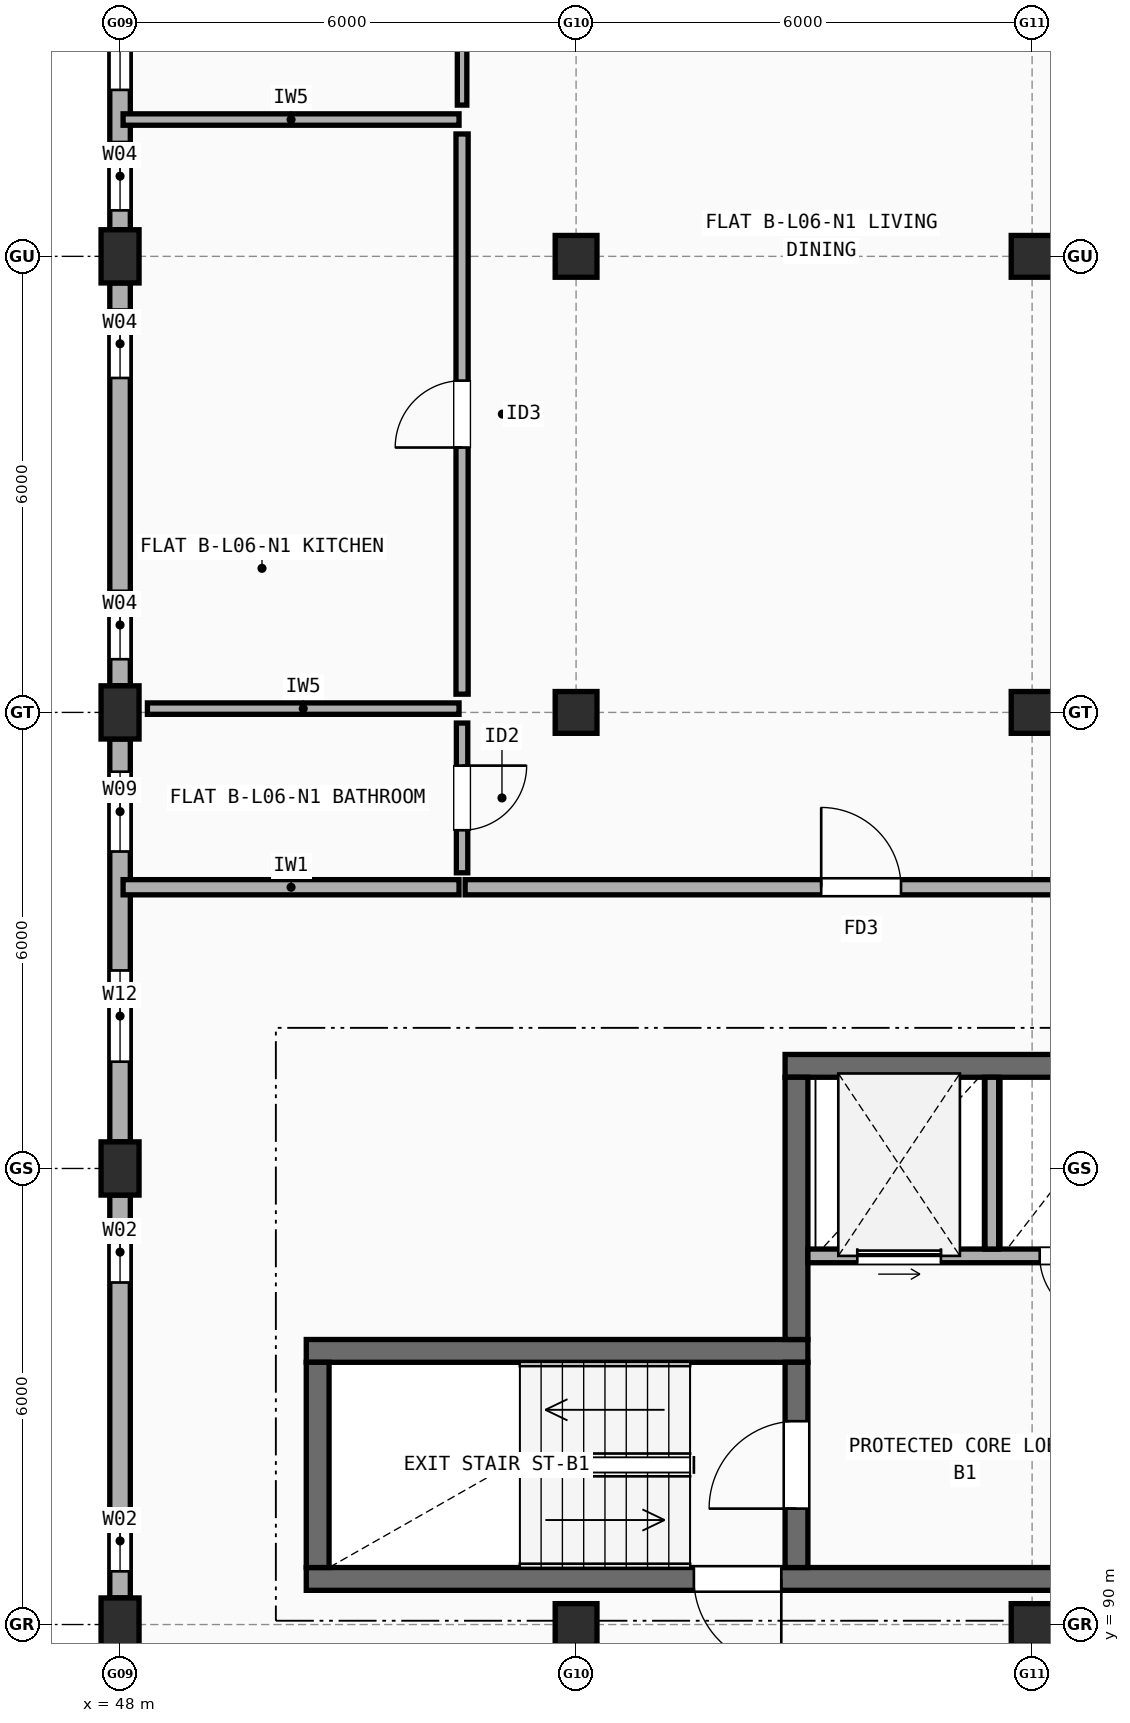
"""IFC4 building model, lengths in metres.
Left out: names, types, materials, properties, quantities, classifications, styles, units other than length and angle.
Written with IfcOpenShell. Run it as: python <this file> out.ifc"""

import sys

from ifc_helpers import new_model, si_unit, direction, frame, frame_2d, origin, origin_2d, place, context, subcontext, project, spatial, rectangle, extrude, element, fill, save


model = new_model("IFC4")
c1 = context("Model", 3, precision=1e-05, world=origin(), true_north=direction((0.0, 1.0)))
c2 = subcontext(c1, "Body", "Model", "MODEL_VIEW")
j1 = project(units=[si_unit("LENGTHUNIT", "METRE"), si_unit("PLANEANGLEUNIT", "RADIAN")], contexts=[c1])
p1 = place(None, origin())
s1 = spatial("IfcSite", under=j1, at=p1, CompositionType="ELEMENT")
p2 = place(p1, origin())
s2 = spatial("IfcBuilding", under=s1, at=p2, CompositionType="ELEMENT")
p3 = place(p2, frame((0.0, 0.0, 20.5)))
s3 = spatial("IfcBuildingStorey", under=s2, at=p3, CompositionType="ELEMENT", Elevation=20.5)
for number, where, z_axis, x_axis in (
    (1, (48.0, 90.0, 0.0), (0.0, 0.0, 1.0), (1.0, 0.0, 0.0)),
    (2, (48.0, 96.0, 0.0), (0.0, 0.0, 1.0), (1.0, 0.0, 0.0)),
    (3, (48.0, 102.0, 0.0), (0.0, 0.0, 1.0), (1.0, 0.0, 0.0)),
    (4, (48.0, 108.0, 0.0), (0.0, 0.0, 1.0), (1.0, 0.0, 0.0)),
):
    element("IfcColumn", number, at=place(p3, frame(where, z_axis=z_axis, x_axis=x_axis)), inside=s3, PredefinedType="COLUMN", context=c2, shape_type="SweptSolid", body=[
        extrude(rectangle(XDim=0.5, YDim=0.7, at=origin_2d()), origin(), (0.0, 0.0, 1.0), 2.97),
    ])
for number, where, z_axis, x_axis in (
    (5, (54.0, 90.0, 0.0), (0.0, 0.0, 1.0), (1.0, 0.0, 0.0)),
    (6, (54.0, 102.0, 0.0), (0.0, 0.0, 1.0), (1.0, 0.0, 0.0)),
    (7, (54.0, 108.0, 0.0), (0.0, 0.0, 1.0), (1.0, 0.0, 0.0)),
    (8, (60.0, 90.0, 0.0), (0.0, 0.0, 1.0), (1.0, 0.0, 0.0)),
    (9, (60.0, 102.0, 0.0), (0.0, 0.0, 1.0), (1.0, 0.0, 0.0)),
    (10, (60.0, 108.0, 0.0), (0.0, 0.0, 1.0), (1.0, 0.0, 0.0)),
):
    element("IfcColumn", number, at=place(p3, frame(where, z_axis=z_axis, x_axis=x_axis)), inside=s3, PredefinedType="COLUMN", context=c2, shape_type="SweptSolid", body=[
        extrude(rectangle(XDim=0.55, YDim=0.55, at=origin_2d()), origin(), (0.0, 0.0, 1.0), 2.97),
    ])
p4 = place(p3, frame((48.0, 113.65, 0.0), z_axis=(0.0, 0.0, 1.0), x_axis=(0.0, -1.0, 0.0)))
e11 = element("IfcWall", 11, at=p4, inside=s3, PredefinedType="STANDARD", context=c2, shape_type="SweptSolid", body=[
    extrude(rectangle(XDim=5.3, YDim=0.27, at=frame_2d((2.65, 0.0))), origin(), (0.0, 0.0, 1.0), 2.452),
])
p5 = place(p4, frame((0.35, 0.0, 0.9)))
e12 = element("IfcOpeningElement", 12, at=p5, cuts=e11, PredefinedType="OPENING", context=c2, shape_type="SweptSolid", body=[
    extrude(rectangle(XDim=1.2, YDim=1.35, at=frame_2d((0.6, 0.675))), frame((0.0, 0.145, 0.0), z_axis=(0.0, -1.0, 0.0), x_axis=(1.0, 0.0, 0.0)), (0.0, 0.0, 1.0), 0.29),
])
p6 = place(p4, frame((2.26, 0.0, 0.9)))
e13 = element("IfcOpeningElement", 13, at=p6, cuts=e11, PredefinedType="OPENING", context=c2, shape_type="SweptSolid", body=[
    extrude(rectangle(XDim=1.2, YDim=1.35, at=frame_2d((0.6, 0.675))), frame((0.0, 0.145, 0.0), z_axis=(0.0, -1.0, 0.0), x_axis=(1.0, 0.0, 0.0)), (0.0, 0.0, 1.0), 0.29),
])
p7 = place(p4, frame((4.145, 0.0, 0.9)))
e14 = element("IfcOpeningElement", 14, at=p7, cuts=e11, PredefinedType="OPENING", context=c2, shape_type="SweptSolid", body=[
    extrude(rectangle(XDim=0.9, YDim=1.3, at=frame_2d((0.45, 0.65))), frame((0.0, 0.145, 0.0), z_axis=(0.0, -1.0, 0.0), x_axis=(1.0, 0.0, 0.0)), (0.0, 0.0, 1.0), 0.29),
])
p8 = place(p3, frame((48.0, 107.65, 0.0), z_axis=(0.0, 0.0, 1.0), x_axis=(0.0, -1.0, 0.0)))
e15 = element("IfcWall", 15, at=p8, inside=s3, PredefinedType="STANDARD", context=c2, shape_type="SweptSolid", body=[
    extrude(rectangle(XDim=5.3, YDim=0.27, at=frame_2d((2.65, 0.0))), origin(), (0.0, 0.0, 1.0), 2.452),
])
p9 = place(p8, frame((0.35, 0.0, 0.9)))
e16 = element("IfcOpeningElement", 16, at=p9, cuts=e15, PredefinedType="OPENING", context=c2, shape_type="SweptSolid", body=[
    extrude(rectangle(XDim=0.9, YDim=1.3, at=frame_2d((0.45, 0.65))), frame((0.0, 0.145, 0.0), z_axis=(0.0, -1.0, 0.0), x_axis=(1.0, 0.0, 0.0)), (0.0, 0.0, 1.0), 0.29),
])
p10 = place(p8, frame((4.05, 0.0, 0.9)))
e17 = element("IfcOpeningElement", 17, at=p10, cuts=e15, PredefinedType="OPENING", context=c2, shape_type="SweptSolid", body=[
    extrude(rectangle(XDim=0.9, YDim=1.3, at=frame_2d((0.45, 0.65))), frame((0.0, 0.145, 0.0), z_axis=(0.0, -1.0, 0.0), x_axis=(1.0, 0.0, 0.0)), (0.0, 0.0, 1.0), 0.29),
])
p11 = place(p3, frame((48.0, 101.65, 0.0), z_axis=(0.0, 0.0, 1.0), x_axis=(0.0, -1.0, 0.0)))
e18 = element("IfcWall", 18, at=p11, inside=s3, PredefinedType="STANDARD", context=c2, shape_type="SweptSolid", body=[
    extrude(rectangle(XDim=5.3, YDim=0.27, at=frame_2d((2.65, 0.0))), origin(), (0.0, 0.0, 1.0), 2.452),
])
p12 = place(p11, frame((0.43, 0.0, 0.9)))
e19 = element("IfcOpeningElement", 19, at=p12, cuts=e18, PredefinedType="OPENING", context=c2, shape_type="SweptSolid", body=[
    extrude(rectangle(XDim=1.05, YDim=1.35, at=frame_2d((0.525, 0.675))), frame((0.0, 0.145, 0.0), z_axis=(0.0, -1.0, 0.0), x_axis=(1.0, 0.0, 0.0)), (0.0, 0.0, 1.0), 0.29),
])
p13 = place(p11, frame((3.045, 0.0, 0.9)))
e20 = element("IfcOpeningElement", 20, at=p13, cuts=e18, PredefinedType="OPENING", context=c2, shape_type="SweptSolid", body=[
    extrude(rectangle(XDim=1.2, YDim=1.35, at=frame_2d((0.6, 0.675))), frame((0.0, 0.145, 0.0), z_axis=(0.0, -1.0, 0.0), x_axis=(1.0, 0.0, 0.0)), (0.0, 0.0, 1.0), 0.29),
])
p14 = place(p3, frame((48.0, 95.65, 0.0), z_axis=(0.0, 0.0, 1.0), x_axis=(0.0, -1.0, 0.0)))
e21 = element("IfcWall", 21, at=p14, inside=s3, PredefinedType="STANDARD", context=c2, shape_type="SweptSolid", body=[
    extrude(rectangle(XDim=5.3, YDim=0.27, at=frame_2d((2.65, 0.0))), origin(), (0.0, 0.0, 1.0), 2.452),
])
p15 = place(p14, frame((0.35, 0.0, 0.9)))
e22 = element("IfcOpeningElement", 22, at=p15, cuts=e21, PredefinedType="OPENING", context=c2, shape_type="SweptSolid", body=[
    extrude(rectangle(XDim=0.8, YDim=1.2, at=frame_2d((0.4, 0.6))), frame((0.0, 0.145, 0.0), z_axis=(0.0, -1.0, 0.0), x_axis=(1.0, 0.0, 0.0)), (0.0, 0.0, 1.0), 0.29),
])
p16 = place(p14, frame((4.15, 0.0, 0.9)))
e23 = element("IfcOpeningElement", 23, at=p16, cuts=e21, PredefinedType="OPENING", context=c2, shape_type="SweptSolid", body=[
    extrude(rectangle(XDim=0.8, YDim=1.2, at=frame_2d((0.4, 0.6))), frame((0.0, 0.145, 0.0), z_axis=(0.0, -1.0, 0.0), x_axis=(1.0, 0.0, 0.0)), (0.0, 0.0, 1.0), 0.29),
])
p17 = place(p3, frame((50.45, 90.6, 0.0), z_axis=(0.0, 0.0, 1.0), x_axis=(1.0, 0.0, 0.0)))
e24 = element("IfcWall", 24, at=p17, inside=s3, PredefinedType="SHEAR", context=c2, shape_type="SweptSolid", body=[
    extrude(rectangle(XDim=11.35, YDim=0.3, at=frame_2d((5.675, 0.0))), origin(), (0.0, 0.0, 1.0), 2.97),
])
p18 = place(p17, frame((5.1, 0.0, 0.0)))
e25 = element("IfcOpeningElement", 25, at=p18, cuts=e24, PredefinedType="OPENING", context=c2, shape_type="SweptSolid", body=[
    extrude(rectangle(XDim=1.15, YDim=2.15, at=frame_2d((0.575, 1.075))), frame((0.0, 0.16, 0.0), z_axis=(0.0, -1.0, 0.0), x_axis=(1.0, 0.0, 0.0)), (0.0, 0.0, 1.0), 0.32),
])
p19 = place(p3, frame((57.05, 93.6, 0.0), z_axis=(0.0, 0.0, 1.0), x_axis=(-1.0, 0.0, 0.0)))
e26 = element("IfcWall", 26, at=p19, inside=s3, PredefinedType="SHEAR", context=c2, shape_type="SweptSolid", body=[
    extrude(rectangle(XDim=6.6, YDim=0.3, at=frame_2d((3.3, 0.0))), origin(), (0.0, 0.0, 1.0), 2.97),
])
p20 = place(p3, frame((50.6, 93.45, 0.0), z_axis=(0.0, 0.0, 1.0), x_axis=(0.0, -1.0, 0.0)))
e27 = element("IfcWall", 27, at=p20, inside=s3, PredefinedType="SHEAR", context=c2, shape_type="SweptSolid", body=[
    extrude(rectangle(XDim=2.7, YDim=0.3, at=frame_2d((1.35, 0.0))), origin(), (0.0, 0.0, 1.0), 2.97),
])
p21 = place(p3, frame((56.9, 90.75, 0.0), z_axis=(0.0, 0.0, 1.0), x_axis=(0.0, 1.0, 0.0)))
e28 = element("IfcWall", 28, at=p21, inside=s3, PredefinedType="SHEAR", context=c2, shape_type="SweptSolid", body=[
    extrude(rectangle(XDim=2.7, YDim=0.3, at=frame_2d((1.35, 0.0))), origin(), (0.0, 0.0, 1.0), 2.97),
])
p22 = place(p21, frame((0.775, 0.0, 0.0)))
e29 = element("IfcOpeningElement", 29, at=p22, cuts=e28, PredefinedType="OPENING", context=c2, shape_type="SweptSolid", body=[
    extrude(rectangle(XDim=1.15, YDim=2.15, at=frame_2d((0.575, 1.075))), frame((0.0, 0.16, 0.0), z_axis=(0.0, -1.0, 0.0), x_axis=(1.0, 0.0, 0.0)), (0.0, 0.0, 1.0), 0.32),
])
p23 = place(p3, frame((61.8, 97.35, 0.0), z_axis=(0.0, 0.0, 1.0), x_axis=(-1.0, 0.0, 0.0)))
e30 = element("IfcWall", 30, at=p23, inside=s3, PredefinedType="SHEAR", context=c2, shape_type="SweptSolid", body=[
    extrude(rectangle(XDim=5.05, YDim=0.3, at=frame_2d((2.525, 0.0))), origin(), (0.0, 0.0, 1.0), 2.97),
])
p24 = place(p3, frame((56.9, 93.75, 0.0), z_axis=(0.0, 0.0, 1.0), x_axis=(0.0, 1.0, 0.0)))
e31 = element("IfcWall", 31, at=p24, inside=s3, PredefinedType="SHEAR", context=c2, shape_type="SweptSolid", body=[
    extrude(rectangle(XDim=3.45, YDim=0.3, at=frame_2d((1.725, 0.0))), origin(), (0.0, 0.0, 1.0), 2.97),
])
p25 = place(p3, frame((57.05, 94.85, 0.0), z_axis=(0.0, 0.0, 1.0), x_axis=(1.0, 0.0, 0.0)))
e32 = element("IfcWall", 32, at=p25, inside=s3, PredefinedType="SOLIDWALL", context=c2, shape_type="SweptSolid", body=[
    extrude(rectangle(XDim=4.45, YDim=0.18, at=frame_2d((2.225, 0.0))), origin(), (0.0, 0.0, 1.0), 2.97),
])
p26 = place(p25, frame((0.65, 0.0, 0.0)))
e33 = element("IfcOpeningElement", 33, at=p26, cuts=e32, PredefinedType="OPENING", context=c2, shape_type="SweptSolid", body=[
    extrude(rectangle(XDim=1.1, YDim=2.15, at=frame_2d((0.55, 1.075))), frame((0.0, 0.1, 0.0), z_axis=(0.0, -1.0, 0.0), x_axis=(1.0, 0.0, 0.0)), (0.0, 0.0, 1.0), 0.2),
])
p27 = place(p25, frame((3.05, 0.0, 0.0)))
e34 = element("IfcOpeningElement", 34, at=p27, cuts=e32, PredefinedType="OPENING", context=c2, shape_type="SweptSolid", body=[
    extrude(rectangle(XDim=0.85, YDim=2.1, at=frame_2d((0.425, 1.05))), frame((0.0, 0.1, 0.0), z_axis=(0.0, -1.0, 0.0), x_axis=(1.0, 0.0, 0.0)), (0.0, 0.0, 1.0), 0.2),
])
p28 = place(p3, frame((59.47, 94.94, 0.0), z_axis=(0.0, 0.0, 1.0), x_axis=(0.0, 1.0, 0.0)))
e35 = element("IfcWall", 35, at=p28, inside=s3, PredefinedType="SOLIDWALL", context=c2, shape_type="SweptSolid", body=[
    extrude(rectangle(XDim=2.26, YDim=0.18, at=frame_2d((1.13, 0.0))), origin(), (0.0, 0.0, 1.0), 2.97),
])
p29 = place(p3, frame((48.04, 99.7, 0.0), z_axis=(0.0, 0.0, 1.0), x_axis=(1.0, 0.0, 0.0)))
e36 = element("IfcWall", 36, at=p29, inside=s3, PredefinedType="SOLIDWALL", context=c2, shape_type="SweptSolid", body=[
    extrude(rectangle(XDim=4.42, YDim=0.2, at=frame_2d((2.21, 0.0))), origin(), (0.0, 0.0, 1.0), 2.452),
])
p30 = place(p3, frame((52.54, 99.7, 0.0), z_axis=(0.0, 0.0, 1.0), x_axis=(1.0, 0.0, 0.0)))
e37 = element("IfcWall", 37, at=p30, inside=s3, PredefinedType="SOLIDWALL", context=c2, shape_type="SweptSolid", body=[
    extrude(rectangle(XDim=10.42, YDim=0.2, at=frame_2d((5.21, 0.0))), origin(), (0.0, 0.0, 1.0), 2.508),
])
p31 = place(p30, frame((4.685, 0.0, 0.0)))
e38 = element("IfcOpeningElement", 38, at=p31, cuts=e37, PredefinedType="OPENING", context=c2, shape_type="SweptSolid", body=[
    extrude(rectangle(XDim=1.05, YDim=2.15, at=frame_2d((0.525, 1.075))), frame((0.0, 0.11, 0.0), z_axis=(0.0, -1.0, 0.0), x_axis=(1.0, 0.0, 0.0)), (0.0, 0.0, 1.0), 0.22),
])
p32 = place(p3, frame((52.5, 109.99, 0.0), z_axis=(0.0, 0.0, 1.0), x_axis=(0.0, 1.0, 0.0)))
e39 = element("IfcWall", 39, at=p32, inside=s3, PredefinedType="PARTITIONING", context=c2, shape_type="SweptSolid", body=[
    extrude(rectangle(XDim=3.82, YDim=0.125, at=frame_2d((1.91, 0.0))), origin(), (0.0, 0.0, 1.0), 2.97),
])
p33 = place(p32, frame((1.46, 0.0, 0.0)))
e40 = element("IfcOpeningElement", 40, at=p33, cuts=e39, PredefinedType="OPENING", context=c2, shape_type="SweptSolid", body=[
    extrude(rectangle(XDim=0.9, YDim=2.1, at=frame_2d((0.45, 1.05))), frame((0.0, 0.073, 0.0), z_axis=(0.0, -1.0, 0.0), x_axis=(1.0, 0.0, 0.0)), (0.0, 0.0, 1.0), 0.145),
])
p34 = place(p3, frame((52.5, 102.24, 0.0), z_axis=(0.0, 0.0, 1.0), x_axis=(0.0, 1.0, 0.0)))
e41 = element("IfcWall", 41, at=p34, inside=s3, PredefinedType="PLUMBINGWALL", context=c2, shape_type="SweptSolid", body=[
    extrude(rectangle(XDim=7.37, YDim=0.16, at=frame_2d((3.685, 0.0))), origin(), (0.0, 0.0, 1.0), 2.452),
])
p35 = place(p34, frame((3.245, 0.0, 0.0)))
e42 = element("IfcOpeningElement", 42, at=p35, cuts=e41, PredefinedType="OPENING", context=c2, shape_type="SweptSolid", body=[
    extrude(rectangle(XDim=0.88, YDim=2.1, at=frame_2d((0.44, 1.05))), frame((0.0, 0.09, 0.0), z_axis=(0.0, -1.0, 0.0), x_axis=(1.0, 0.0, 0.0)), (0.0, 0.0, 1.0), 0.18),
])
p36 = place(p3, frame((52.5, 99.89, 0.0), z_axis=(0.0, 0.0, 1.0), x_axis=(0.0, 1.0, 0.0)))
e43 = element("IfcWall", 43, at=p36, inside=s3, PredefinedType="PARTITIONING", context=c2, shape_type="SweptSolid", body=[
    extrude(rectangle(XDim=1.97, YDim=0.15, at=frame_2d((0.985, 0.0))), origin(), (0.0, 0.0, 1.0), 2.97),
])
p37 = place(p36, frame((0.56, 0.0, 0.0)))
e44 = element("IfcOpeningElement", 44, at=p37, cuts=e43, PredefinedType="OPENING", context=c2, shape_type="SweptSolid", body=[
    extrude(rectangle(XDim=0.85, YDim=2.1, at=frame_2d((0.425, 1.05))), frame((0.0, 0.085, 0.0), z_axis=(0.0, -1.0, 0.0), x_axis=(1.0, 0.0, 0.0)), (0.0, 0.0, 1.0), 0.17),
])
p38 = place(p3, frame((48.04, 109.8, 0.0), z_axis=(0.0, 0.0, 1.0), x_axis=(1.0, 0.0, 0.0)))
e45 = element("IfcWall", 45, at=p38, inside=s3, PredefinedType="PARTITIONING", context=c2, shape_type="SweptSolid", body=[
    extrude(rectangle(XDim=4.42, YDim=0.15, at=frame_2d((2.21, 0.0))), origin(), (0.0, 0.0, 1.0), 2.452),
])
p39 = place(p3, frame((48.36, 102.05, 0.0), z_axis=(0.0, 0.0, 1.0), x_axis=(1.0, 0.0, 0.0)))
e46 = element("IfcWall", 46, at=p39, inside=s3, PredefinedType="PARTITIONING", context=c2, shape_type="SweptSolid", body=[
    extrude(rectangle(XDim=4.1, YDim=0.15, at=frame_2d((2.05, 0.0))), origin(), (0.0, 0.0, 1.0), 2.452),
])
p40 = place(p6, origin())
e47 = element("IfcWindow", 47, at=p40, inside=s3, PartitioningType="SINGLE_PANEL", PredefinedType="WINDOW", context=c2, shape_type="SweptSolid", body=[
    extrude(rectangle(XDim=1.2, YDim=1.35, at=frame_2d((0.6, 0.675))), frame((0.0, 0.03, 0.0), z_axis=(0.0, -1.0, 0.0), x_axis=(1.0, 0.0, 0.0)), (0.0, 0.0, 1.0), 0.06),
])
fill(e13, e47)
p41 = place(p7, origin())
e48 = element("IfcWindow", 48, at=p41, inside=s3, PartitioningType="SINGLE_PANEL", PredefinedType="WINDOW", context=c2, shape_type="SweptSolid", body=[
    extrude(rectangle(XDim=0.9, YDim=1.3, at=frame_2d((0.45, 0.65))), frame((0.0, 0.03, 0.0), z_axis=(0.0, -1.0, 0.0), x_axis=(1.0, 0.0, 0.0)), (0.0, 0.0, 1.0), 0.06),
])
fill(e14, e48)
p42 = place(p9, origin())
e49 = element("IfcWindow", 49, at=p42, inside=s3, PartitioningType="SINGLE_PANEL", PredefinedType="WINDOW", context=c2, shape_type="SweptSolid", body=[
    extrude(rectangle(XDim=0.9, YDim=1.3, at=frame_2d((0.45, 0.65))), frame((0.0, 0.03, 0.0), z_axis=(0.0, -1.0, 0.0), x_axis=(1.0, 0.0, 0.0)), (0.0, 0.0, 1.0), 0.06),
])
fill(e16, e49)
p43 = place(p10, origin())
e50 = element("IfcWindow", 50, at=p43, inside=s3, PartitioningType="SINGLE_PANEL", PredefinedType="WINDOW", context=c2, shape_type="SweptSolid", body=[
    extrude(rectangle(XDim=0.9, YDim=1.3, at=frame_2d((0.45, 0.65))), frame((0.0, 0.03, 0.0), z_axis=(0.0, -1.0, 0.0), x_axis=(1.0, 0.0, 0.0)), (0.0, 0.0, 1.0), 0.06),
])
fill(e17, e50)
p44 = place(p12, origin())
e51 = element("IfcWindow", 51, at=p44, inside=s3, PartitioningType="SINGLE_PANEL", PredefinedType="WINDOW", context=c2, shape_type="SweptSolid", body=[
    extrude(rectangle(XDim=1.05, YDim=1.35, at=frame_2d((0.525, 0.675))), frame((0.0, 0.03, 0.0), z_axis=(0.0, -1.0, 0.0), x_axis=(1.0, 0.0, 0.0)), (0.0, 0.0, 1.0), 0.06),
])
fill(e19, e51)
p45 = place(p13, origin())
e52 = element("IfcWindow", 52, at=p45, inside=s3, PartitioningType="SINGLE_PANEL", PredefinedType="WINDOW", context=c2, shape_type="SweptSolid", body=[
    extrude(rectangle(XDim=1.2, YDim=1.35, at=frame_2d((0.6, 0.675))), frame((0.0, 0.03, 0.0), z_axis=(0.0, -1.0, 0.0), x_axis=(1.0, 0.0, 0.0)), (0.0, 0.0, 1.0), 0.06),
])
fill(e20, e52)
p46 = place(p15, origin())
e53 = element("IfcWindow", 53, at=p46, inside=s3, PartitioningType="SINGLE_PANEL", PredefinedType="WINDOW", context=c2, shape_type="SweptSolid", body=[
    extrude(rectangle(XDim=0.8, YDim=1.2, at=frame_2d((0.4, 0.6))), frame((0.0, 0.03, 0.0), z_axis=(0.0, -1.0, 0.0), x_axis=(1.0, 0.0, 0.0)), (0.0, 0.0, 1.0), 0.06),
])
fill(e22, e53)
p47 = place(p16, origin())
e54 = element("IfcWindow", 54, at=p47, inside=s3, PartitioningType="SINGLE_PANEL", PredefinedType="WINDOW", context=c2, shape_type="SweptSolid", body=[
    extrude(rectangle(XDim=0.8, YDim=1.2, at=frame_2d((0.4, 0.6))), frame((0.0, 0.03, 0.0), z_axis=(0.0, -1.0, 0.0), x_axis=(1.0, 0.0, 0.0)), (0.0, 0.0, 1.0), 0.06),
])
fill(e23, e54)
p48 = place(p18, origin())
e55 = element("IfcDoor", 55, at=p48, inside=s3, OperationType="SINGLE_SWING_RIGHT", PredefinedType="DOOR", context=c2, shape_type="SweptSolid", body=[
    extrude(rectangle(XDim=1.15, YDim=2.15, at=frame_2d((0.575, 1.075))), frame((0.0, 0.025, 0.0), z_axis=(0.0, -1.0, 0.0), x_axis=(1.0, 0.0, 0.0)), (0.0, 0.0, 1.0), 0.05),
])
fill(e25, e55)
p49 = place(p22, origin())
e56 = element("IfcDoor", 56, at=p49, inside=s3, OperationType="SINGLE_SWING_LEFT", PredefinedType="DOOR", context=c2, shape_type="SweptSolid", body=[
    extrude(rectangle(XDim=1.15, YDim=2.15, at=frame_2d((0.575, 1.075))), frame((0.0, 0.025, 0.0), z_axis=(0.0, -1.0, 0.0), x_axis=(1.0, 0.0, 0.0)), (0.0, 0.0, 1.0), 0.05),
])
fill(e29, e56)
p50 = place(p26, origin())
e57 = element("IfcDoor", 57, at=p50, inside=s3, OperationType="SLIDING_TO_LEFT", PredefinedType="DOOR", context=c2, shape_type="SweptSolid", body=[
    extrude(rectangle(XDim=1.1, YDim=2.15, at=frame_2d((0.55, 1.075))), frame((0.0, 0.025, 0.0), z_axis=(0.0, -1.0, 0.0), x_axis=(1.0, 0.0, 0.0)), (0.0, 0.0, 1.0), 0.05),
])
fill(e33, e57)
p51 = place(p27, frame((0.85, 0.0, 0.0), z_axis=(0.0, 0.0, 1.0), x_axis=(-1.0, 0.0, 0.0)))
e58 = element("IfcDoor", 58, at=p51, inside=s3, OperationType="SINGLE_SWING_RIGHT", PredefinedType="DOOR", context=c2, shape_type="SweptSolid", body=[
    extrude(rectangle(XDim=0.85, YDim=2.1, at=frame_2d((0.425, 1.05))), frame((0.0, 0.025, 0.0), z_axis=(0.0, -1.0, 0.0), x_axis=(1.0, 0.0, 0.0)), (0.0, 0.0, 1.0), 0.05),
])
fill(e34, e58)
p52 = place(p31, origin())
e59 = element("IfcDoor", 59, at=p52, inside=s3, OperationType="SINGLE_SWING_LEFT", PredefinedType="DOOR", context=c2, shape_type="SweptSolid", body=[
    extrude(rectangle(XDim=1.05, YDim=2.15, at=frame_2d((0.525, 1.075))), frame((0.0, 0.025, 0.0), z_axis=(0.0, -1.0, 0.0), x_axis=(1.0, 0.0, 0.0)), (0.0, 0.0, 1.0), 0.05),
])
fill(e38, e59)
p53 = place(p35, origin())
e60 = element("IfcDoor", 60, at=p53, inside=s3, OperationType="SINGLE_SWING_LEFT", PredefinedType="DOOR", context=c2, shape_type="SweptSolid", body=[
    extrude(rectangle(XDim=0.88, YDim=2.1, at=frame_2d((0.44, 1.05))), frame((0.0, 0.025, 0.0), z_axis=(0.0, -1.0, 0.0), x_axis=(1.0, 0.0, 0.0)), (0.0, 0.0, 1.0), 0.05),
])
fill(e42, e60)
p54 = place(p37, origin())
e61 = element("IfcDoor", 61, at=p54, inside=s3, OperationType="SINGLE_SWING_RIGHT", PredefinedType="DOOR", context=c2, shape_type="SweptSolid", body=[
    extrude(rectangle(XDim=0.85, YDim=2.1, at=frame_2d((0.425, 1.05))), frame((0.0, 0.025, 0.0), z_axis=(0.0, -1.0, 0.0), x_axis=(1.0, 0.0, 0.0)), (0.0, 0.0, 1.0), 0.05),
])
fill(e44, e61)
save(model, sys.argv[1])
